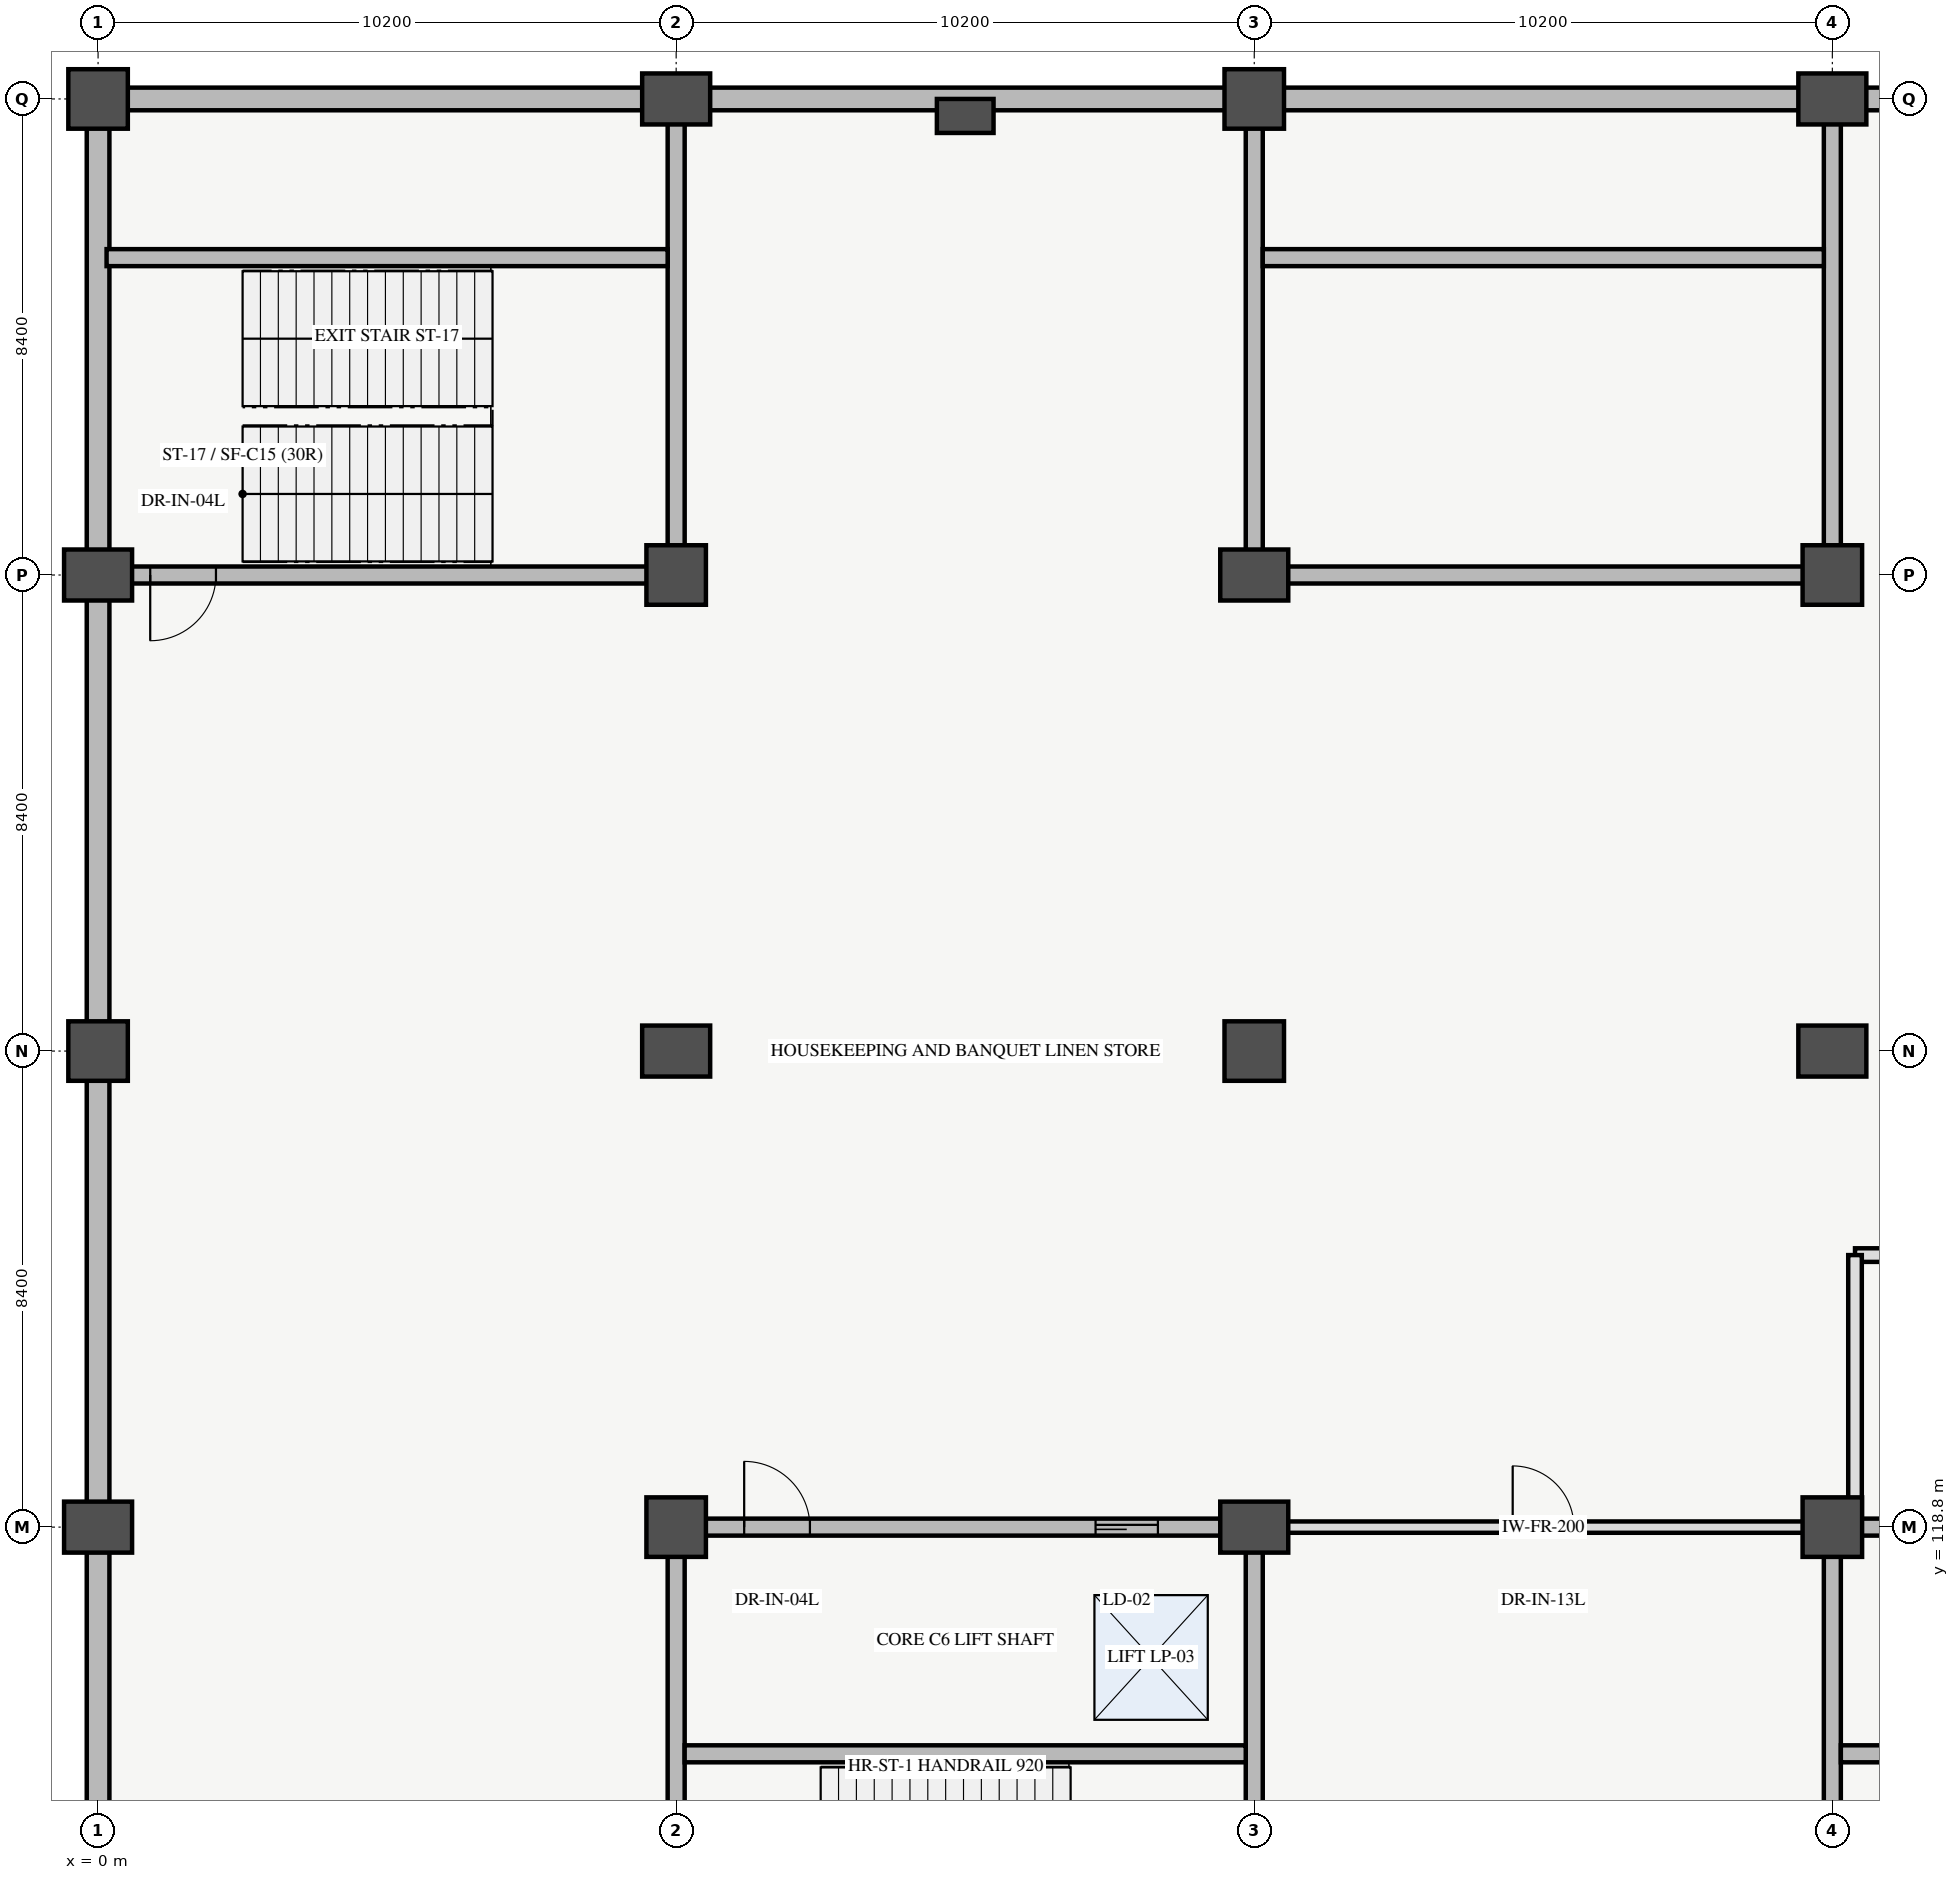
"""IFC4 building model, lengths in metres.
Left out: names, types, materials, properties, quantities, classifications, styles, units other than length and angle.
Written with IfcOpenShell. Run it as: python <this file> out.ifc"""

import sys

from ifc_helpers import new_model, si_unit, direction, frame, frame_2d, origin, origin_2d, place, context, subcontext, project, spatial, rectangle, extrude, element, fill, save


model = new_model("IFC4")
c1 = context("Model", 3, precision=1e-05, world=origin(), true_north=direction((0.0, 1.0)))
c2 = subcontext(c1, "Body", "Model", "MODEL_VIEW")
j1 = project(units=[si_unit("LENGTHUNIT", "METRE"), si_unit("PLANEANGLEUNIT", "RADIAN")], contexts=[c1])
p1 = place(None, origin())
s1 = spatial("IfcSite", under=j1, at=p1, CompositionType="ELEMENT")
p2 = place(p1, origin())
s2 = spatial("IfcBuilding", under=s1, at=p2, CompositionType="ELEMENT")
p3 = place(p2, frame((0.0, 0.0, -4.5)))
s3 = spatial("IfcBuildingStorey", under=s2, at=p3, CompositionType="ELEMENT", Elevation=-4.5)
p4 = place(p3, frame((0.0, 118.8, 0.0), z_axis=(0.0, 0.0, 1.0), x_axis=(1.0, 0.0, 0.0)))
e1 = element("IfcColumn", 1, at=p4, inside=s3, PredefinedType="COLUMN", context=c2, shape_type="SweptSolid", body=[
    extrude(rectangle(XDim=1.2, YDim=0.9, at=origin_2d()), origin(), (0.0, 0.0, 1.0), 4.5),
])
p5 = place(p3, frame((0.0, 127.2, 0.0), z_axis=(0.0, 0.0, 1.0), x_axis=(1.0, 0.0, 0.0)))
e2 = element("IfcColumn", 2, at=p5, inside=s3, PredefinedType="COLUMN", context=c2, shape_type="SweptSolid", body=[
    extrude(rectangle(XDim=1.05, YDim=1.05, at=origin_2d()), origin(), (0.0, 0.0, 1.0), 4.5),
])
p6 = place(p3, frame((0.0, 135.6, 0.0), z_axis=(0.0, 0.0, 1.0), x_axis=(1.0, 0.0, 0.0)))
e3 = element("IfcColumn", 3, at=p6, inside=s3, PredefinedType="COLUMN", context=c2, shape_type="SweptSolid", body=[
    extrude(rectangle(XDim=1.2, YDim=0.9, at=origin_2d()), origin(), (0.0, 0.0, 1.0), 4.5),
])
for number, where, z_axis, x_axis in (
    (4, (0.0, 144.0, 0.0), (0.0, 0.0, 1.0), (1.0, 0.0, 0.0)),
    (5, (10.2, 118.8, 0.0), (0.0, 0.0, 1.0), (1.0, 0.0, 0.0)),
):
    element("IfcColumn", number, at=place(p3, frame(where, z_axis=z_axis, x_axis=x_axis)), inside=s3, PredefinedType="COLUMN", context=c2, shape_type="SweptSolid", body=[
        extrude(rectangle(XDim=1.05, YDim=1.05, at=origin_2d()), origin(), (0.0, 0.0, 1.0), 4.5),
    ])
p7 = place(p3, frame((10.2, 127.2, 0.0), z_axis=(0.0, 0.0, 1.0), x_axis=(1.0, 0.0, 0.0)))
e6 = element("IfcColumn", 6, at=p7, inside=s3, PredefinedType="COLUMN", context=c2, shape_type="SweptSolid", body=[
    extrude(rectangle(XDim=1.2, YDim=0.9, at=origin_2d()), origin(), (0.0, 0.0, 1.0), 4.5),
])
p8 = place(p3, frame((10.2, 135.6, 0.0), z_axis=(0.0, 0.0, 1.0), x_axis=(1.0, 0.0, 0.0)))
e7 = element("IfcColumn", 7, at=p8, inside=s3, PredefinedType="COLUMN", context=c2, shape_type="SweptSolid", body=[
    extrude(rectangle(XDim=1.05, YDim=1.05, at=origin_2d()), origin(), (0.0, 0.0, 1.0), 4.5),
])
for number, where, z_axis, x_axis in (
    (8, (10.2, 144.0, 0.0), (0.0, 0.0, 1.0), (1.0, 0.0, 0.0)),
    (9, (20.4, 118.8, 0.0), (0.0, 0.0, 1.0), (1.0, 0.0, 0.0)),
):
    element("IfcColumn", number, at=place(p3, frame(where, z_axis=z_axis, x_axis=x_axis)), inside=s3, PredefinedType="COLUMN", context=c2, shape_type="SweptSolid", body=[
        extrude(rectangle(XDim=1.2, YDim=0.9, at=origin_2d()), origin(), (0.0, 0.0, 1.0), 4.5),
    ])
p9 = place(p3, frame((20.4, 127.2, 0.0), z_axis=(0.0, 0.0, 1.0), x_axis=(1.0, 0.0, 0.0)))
e10 = element("IfcColumn", 10, at=p9, inside=s3, PredefinedType="COLUMN", context=c2, shape_type="SweptSolid", body=[
    extrude(rectangle(XDim=1.05, YDim=1.05, at=origin_2d()), origin(), (0.0, 0.0, 1.0), 4.5),
])
p10 = place(p3, frame((20.4, 135.6, 0.0), z_axis=(0.0, 0.0, 1.0), x_axis=(1.0, 0.0, 0.0)))
e11 = element("IfcColumn", 11, at=p10, inside=s3, PredefinedType="COLUMN", context=c2, shape_type="SweptSolid", body=[
    extrude(rectangle(XDim=1.2, YDim=0.9, at=origin_2d()), origin(), (0.0, 0.0, 1.0), 4.5),
])
for number, where, z_axis, x_axis in (
    (12, (20.4, 144.0, 0.0), (0.0, 0.0, 1.0), (1.0, 0.0, 0.0)),
    (13, (30.6, 118.8, 0.0), (0.0, 0.0, 1.0), (1.0, 0.0, 0.0)),
):
    element("IfcColumn", number, at=place(p3, frame(where, z_axis=z_axis, x_axis=x_axis)), inside=s3, PredefinedType="COLUMN", context=c2, shape_type="SweptSolid", body=[
        extrude(rectangle(XDim=1.05, YDim=1.05, at=origin_2d()), origin(), (0.0, 0.0, 1.0), 4.5),
    ])
p11 = place(p3, frame((30.6, 127.2, 0.0), z_axis=(0.0, 0.0, 1.0), x_axis=(1.0, 0.0, 0.0)))
e14 = element("IfcColumn", 14, at=p11, inside=s3, PredefinedType="COLUMN", context=c2, shape_type="SweptSolid", body=[
    extrude(rectangle(XDim=1.2, YDim=0.9, at=origin_2d()), origin(), (0.0, 0.0, 1.0), 4.5),
])
p12 = place(p3, frame((30.6, 135.6, 0.0), z_axis=(0.0, 0.0, 1.0), x_axis=(1.0, 0.0, 0.0)))
e15 = element("IfcColumn", 15, at=p12, inside=s3, PredefinedType="COLUMN", context=c2, shape_type="SweptSolid", body=[
    extrude(rectangle(XDim=1.05, YDim=1.05, at=origin_2d()), origin(), (0.0, 0.0, 1.0), 4.5),
])
p13 = place(p3, frame((30.6, 144.0, 0.0), z_axis=(0.0, 0.0, 1.0), x_axis=(1.0, 0.0, 0.0)))
e16 = element("IfcColumn", 16, at=p13, inside=s3, PredefinedType="COLUMN", context=c2, shape_type="SweptSolid", body=[
    extrude(rectangle(XDim=1.2, YDim=0.9, at=origin_2d()), origin(), (0.0, 0.0, 1.0), 4.5),
])
p14 = place(p3, frame((15.3, 143.7, 0.0), z_axis=(0.0, 0.0, 1.0), x_axis=(1.0, 0.0, 0.0)))
e17 = element("IfcColumn", 17, at=p14, inside=s3, PredefinedType="PILASTER", context=c2, shape_type="SweptSolid", body=[
    extrude(rectangle(XDim=1.0, YDim=0.6, at=origin_2d()), origin(), (0.0, 0.0, 1.0), 4.5),
])
p15 = place(p3, frame((10.2, 118.8, 0.0), z_axis=(0.0, 0.0, 1.0), x_axis=(1.0, 0.0, 0.0)))
e18 = element("IfcWall", 18, at=p15, inside=s3, PredefinedType="SHEAR", context=c2, shape_type="SweptSolid", body=[
    extrude(rectangle(XDim=10.2, YDim=0.3, at=frame_2d((5.1, 0.0))), origin(), (0.0, 0.0, 1.0), 4.5),
])
p16 = place(p15, frame((1.2, 0.0, 0.0)))
e19 = element("IfcOpeningElement", 19, at=p16, cuts=e18, PredefinedType="OPENING", context=c2, shape_type="SweptSolid", body=[
    extrude(rectangle(XDim=1.16, YDim=2.2, at=frame_2d((0.58, 1.1))), frame((0.0, 0.16, 0.0), z_axis=(0.0, -1.0, 0.0), x_axis=(1.0, 0.0, 0.0)), (0.0, 0.0, 1.0), 0.32),
])
p17 = place(p15, frame((7.4, 0.0, 0.0)))
e20 = element("IfcOpeningElement", 20, at=p17, cuts=e18, PredefinedType="OPENING", context=c2, shape_type="SweptSolid", body=[
    extrude(rectangle(XDim=1.1, YDim=2.2, at=frame_2d((0.55, 1.1))), frame((0.0, 0.16, 0.0), z_axis=(0.0, -1.0, 0.0), x_axis=(1.0, 0.0, 0.0)), (0.0, 0.0, 1.0), 0.32),
])
for number, where, z_axis, x_axis in (
    (21, (10.2, 109.2, 0.0), (0.0, 0.0, 1.0), (0.0, 1.0, 0.0)),
    (22, (20.4, 109.2, 0.0), (0.0, 0.0, 1.0), (0.0, 1.0, 0.0)),
):
    element("IfcWall", number, at=place(p3, frame(where, z_axis=z_axis, x_axis=x_axis)), inside=s3, PredefinedType="SHEAR", context=c2, shape_type="SweptSolid", body=[
        extrude(rectangle(XDim=9.6, YDim=0.3, at=frame_2d((4.8, 0.0))), origin(), (0.0, 0.0, 1.0), 4.5),
    ])
p18 = place(p3, frame((30.6, 118.8, 0.0), z_axis=(0.0, 0.0, 1.0), x_axis=(1.0, 0.0, 0.0)))
e23 = element("IfcWall", 23, at=p18, inside=s3, PredefinedType="SHEAR", context=c2, shape_type="SweptSolid", body=[
    extrude(rectangle(XDim=10.2, YDim=0.3, at=frame_2d((5.1, 0.0))), origin(), (0.0, 0.0, 1.0), 4.5),
])
p19 = place(p18, frame((1.2, 0.0, 0.0)))
e24 = element("IfcOpeningElement", 24, at=p19, cuts=e23, PredefinedType="OPENING", context=c2, shape_type="SweptSolid", body=[
    extrude(rectangle(XDim=1.16, YDim=2.2, at=frame_2d((0.58, 1.1))), frame((0.0, 0.16, 0.0), z_axis=(0.0, -1.0, 0.0), x_axis=(1.0, 0.0, 0.0)), (0.0, 0.0, 1.0), 0.32),
])
p20 = place(p18, frame((7.4, 0.0, 0.0)))
e25 = element("IfcOpeningElement", 25, at=p20, cuts=e23, PredefinedType="OPENING", context=c2, shape_type="SweptSolid", body=[
    extrude(rectangle(XDim=1.2, YDim=2.25, at=frame_2d((0.6, 1.125))), frame((0.0, 0.16, 0.0), z_axis=(0.0, -1.0, 0.0), x_axis=(1.0, 0.0, 0.0)), (0.0, 0.0, 1.0), 0.32),
])
p21 = place(p3, frame((30.6, 109.2, 0.0), z_axis=(0.0, 0.0, 1.0), x_axis=(0.0, 1.0, 0.0)))
e26 = element("IfcWall", 26, at=p21, inside=s3, PredefinedType="SHEAR", context=c2, shape_type="SweptSolid", body=[
    extrude(rectangle(XDim=9.6, YDim=0.3, at=frame_2d((4.8, 0.0))), origin(), (0.0, 0.0, 1.0), 4.5),
])
p22 = place(p3, frame((0.0, 144.0, 0.0), z_axis=(0.0, 0.0, 1.0), x_axis=(1.0, 0.0, 0.0)))
e27 = element("IfcWall", 27, at=p22, inside=s3, PredefinedType="SOLIDWALL", context=c2, shape_type="SweptSolid", body=[
    extrude(rectangle(XDim=224.4, YDim=0.4, at=frame_2d((112.2, 0.0))), origin(), (0.0, 0.0, 1.0), 4.1),
])
p23 = place(p3, frame((0.0, 19.2, 0.0), z_axis=(0.0, 0.0, 1.0), x_axis=(0.0, 1.0, 0.0)))
e28 = element("IfcWall", 28, at=p23, inside=s3, PredefinedType="SOLIDWALL", context=c2, shape_type="SweptSolid", body=[
    extrude(rectangle(XDim=124.8, YDim=0.4, at=frame_2d((62.4, 0.0))), origin(), (0.0, 0.0, 1.0), 4.1),
])
for number, where, z_axis, x_axis in (
    (29, (10.35, 114.8, 0.0), (0.0, 0.0, 1.0), (1.0, 0.0, 0.0)),
    (30, (30.75, 114.8, 0.0), (0.0, 0.0, 1.0), (1.0, 0.0, 0.0)),
):
    element("IfcWall", number, at=place(p3, frame(where, z_axis=z_axis, x_axis=x_axis)), inside=s3, PredefinedType="SHEAR", context=c2, shape_type="SweptSolid", body=[
        extrude(rectangle(XDim=9.9, YDim=0.3, at=frame_2d((4.95, 0.0))), origin(), (0.0, 0.0, 1.0), 4.5),
    ])
p24 = place(p3, frame((20.4, 135.6, 0.0), z_axis=(0.0, 0.0, 1.0), x_axis=(1.0, 0.0, 0.0)))
e31 = element("IfcWall", 31, at=p24, inside=s3, PredefinedType="SHEAR", context=c2, shape_type="SweptSolid", body=[
    extrude(rectangle(XDim=10.2, YDim=0.3, at=frame_2d((5.1, 0.0))), origin(), (0.0, 0.0, 1.0), 4.5),
])
for number, where, z_axis, x_axis in (
    (32, (20.4, 135.6, 0.0), (0.0, 0.0, 1.0), (0.0, 1.0, 0.0)),
    (33, (30.6, 135.6, 0.0), (0.0, 0.0, 1.0), (0.0, 1.0, 0.0)),
):
    element("IfcWall", number, at=place(p3, frame(where, z_axis=z_axis, x_axis=x_axis)), inside=s3, PredefinedType="SHEAR", context=c2, shape_type="SweptSolid", body=[
        extrude(rectangle(XDim=8.4, YDim=0.3, at=frame_2d((4.2, 0.0))), origin(), (0.0, 0.0, 1.0), 4.5),
    ])
p25 = place(p3, frame((20.55, 141.2, 0.0), z_axis=(0.0, 0.0, 1.0), x_axis=(1.0, 0.0, 0.0)))
e34 = element("IfcWall", 34, at=p25, inside=s3, PredefinedType="SHEAR", context=c2, shape_type="SweptSolid", body=[
    extrude(rectangle(XDim=9.9, YDim=0.3, at=frame_2d((4.95, 0.0))), origin(), (0.0, 0.0, 1.0), 4.5),
])
p26 = place(p3, frame((0.0, 135.6, 0.0), z_axis=(0.0, 0.0, 1.0), x_axis=(1.0, 0.0, 0.0)))
e35 = element("IfcWall", 35, at=p26, inside=s3, PredefinedType="SHEAR", context=c2, shape_type="SweptSolid", body=[
    extrude(rectangle(XDim=10.2, YDim=0.3, at=frame_2d((5.1, 0.0))), origin(), (0.0, 0.0, 1.0), 4.5),
])
p27 = place(p26, frame((0.92, 0.0, 0.0)))
e36 = element("IfcOpeningElement", 36, at=p27, cuts=e35, PredefinedType="OPENING", context=c2, shape_type="SweptSolid", body=[
    extrude(rectangle(XDim=1.16, YDim=2.2, at=frame_2d((0.58, 1.1))), frame((0.0, 0.16, 0.0), z_axis=(0.0, -1.0, 0.0), x_axis=(1.0, 0.0, 0.0)), (0.0, 0.0, 1.0), 0.32),
])
p28 = place(p3, frame((10.2, 135.6, 0.0), z_axis=(0.0, 0.0, 1.0), x_axis=(0.0, 1.0, 0.0)))
e37 = element("IfcWall", 37, at=p28, inside=s3, PredefinedType="SHEAR", context=c2, shape_type="SweptSolid", body=[
    extrude(rectangle(XDim=8.4, YDim=0.3, at=frame_2d((4.2, 0.0))), origin(), (0.0, 0.0, 1.0), 4.5),
])
p29 = place(p3, frame((0.15, 141.2, 0.0), z_axis=(0.0, 0.0, 1.0), x_axis=(1.0, 0.0, 0.0)))
e38 = element("IfcWall", 38, at=p29, inside=s3, PredefinedType="SHEAR", context=c2, shape_type="SweptSolid", body=[
    extrude(rectangle(XDim=9.9, YDim=0.3, at=frame_2d((4.95, 0.0))), origin(), (0.0, 0.0, 1.0), 4.5),
])
p30 = place(p3, frame((31.0, 123.6, 0.0), z_axis=(0.0, 0.0, 1.0), x_axis=(1.0, 0.0, 0.0)))
e39 = element("IfcWall", 39, at=p30, inside=s3, PredefinedType="PARTITIONING", context=c2, shape_type="SweptSolid", body=[
    extrude(rectangle(XDim=9.4, YDim=0.24, at=frame_2d((4.7, 0.0))), origin(), (0.0, 0.0, 1.0), 2.75),
])
p31 = place(p30, frame((3.75, 0.0, 0.0)))
e40 = element("IfcOpeningElement", 40, at=p31, cuts=e39, PredefinedType="OPENING", context=c2, shape_type="SweptSolid", body=[
    extrude(rectangle(XDim=1.9, YDim=2.25, at=frame_2d((0.95, 1.125))), frame((0.0, 0.13, 0.0), z_axis=(0.0, -1.0, 0.0), x_axis=(1.0, 0.0, 0.0)), (0.0, 0.0, 1.0), 0.26),
])
p32 = place(p3, frame((31.0, 119.0, 0.0), z_axis=(0.0, 0.0, 1.0), x_axis=(0.0, 1.0, 0.0)))
e41 = element("IfcWall", 41, at=p32, inside=s3, PredefinedType="PARTITIONING", context=c2, shape_type="SweptSolid", body=[
    extrude(rectangle(XDim=4.6, YDim=0.24, at=frame_2d((2.3, 0.0))), origin(), (0.0, 0.0, 1.0), 2.75),
])
p33 = place(p3, frame((20.8, 118.8, 0.0), z_axis=(0.0, 0.0, 1.0), x_axis=(1.0, 0.0, 0.0)))
e42 = element("IfcWall", 42, at=p33, inside=s3, PredefinedType="PARTITIONING", context=c2, shape_type="SweptSolid", body=[
    extrude(rectangle(XDim=9.4, YDim=0.2, at=frame_2d((4.7, 0.0))), origin(), (0.0, 0.0, 1.0), 2.75),
])
p34 = place(p33, frame((4.16, 0.0, 0.0)))
e43 = element("IfcOpeningElement", 43, at=p34, cuts=e42, PredefinedType="OPENING", context=c2, shape_type="SweptSolid", body=[
    extrude(rectangle(XDim=1.08, YDim=2.18, at=frame_2d((0.54, 1.09))), frame((0.0, 0.11, 0.0), z_axis=(0.0, -1.0, 0.0), x_axis=(1.0, 0.0, 0.0)), (0.0, 0.0, 1.0), 0.22),
])
p35 = place(p16, origin())
e44 = element("IfcDoor", 44, at=p35, inside=s3, OperationType="SINGLE_SWING_LEFT", PredefinedType="DOOR", context=c2, shape_type="SweptSolid", body=[
    extrude(rectangle(XDim=1.16, YDim=2.2, at=frame_2d((0.58, 1.1))), frame((0.0, 0.025, 0.0), z_axis=(0.0, -1.0, 0.0), x_axis=(1.0, 0.0, 0.0)), (0.0, 0.0, 1.0), 0.05),
])
fill(e19, e44)
p36 = place(p17, origin())
e45 = element("IfcDoor", 45, at=p36, inside=s3, OperationType="SLIDING_TO_RIGHT", PredefinedType="DOOR", context=c2, shape_type="SweptSolid", body=[
    extrude(rectangle(XDim=1.1, YDim=2.2, at=frame_2d((0.55, 1.1))), frame((0.0, 0.025, 0.0), z_axis=(0.0, -1.0, 0.0), x_axis=(1.0, 0.0, 0.0)), (0.0, 0.0, 1.0), 0.05),
])
fill(e20, e45)
p37 = place(p27, origin())
e46 = element("IfcDoor", 46, at=p37, inside=s3, OperationType="SINGLE_SWING_LEFT", PredefinedType="DOOR", context=c2, shape_type="SweptSolid", body=[
    extrude(rectangle(XDim=1.16, YDim=2.2, at=frame_2d((0.58, 1.1))), frame((0.0, 0.025, 0.0), z_axis=(0.0, -1.0, 0.0), x_axis=(1.0, 0.0, 0.0)), (0.0, 0.0, 1.0), 0.05),
])
fill(e36, e46)
p38 = place(p34, origin())
e47 = element("IfcDoor", 47, at=p38, inside=s3, OperationType="SINGLE_SWING_LEFT", PredefinedType="DOOR", context=c2, shape_type="SweptSolid", body=[
    extrude(rectangle(XDim=1.08, YDim=2.18, at=frame_2d((0.54, 1.09))), frame((0.0, 0.025, 0.0), z_axis=(0.0, -1.0, 0.0), x_axis=(1.0, 0.0, 0.0)), (0.0, 0.0, 1.0), 0.05),
])
fill(e43, e47)
save(model, sys.argv[1])
